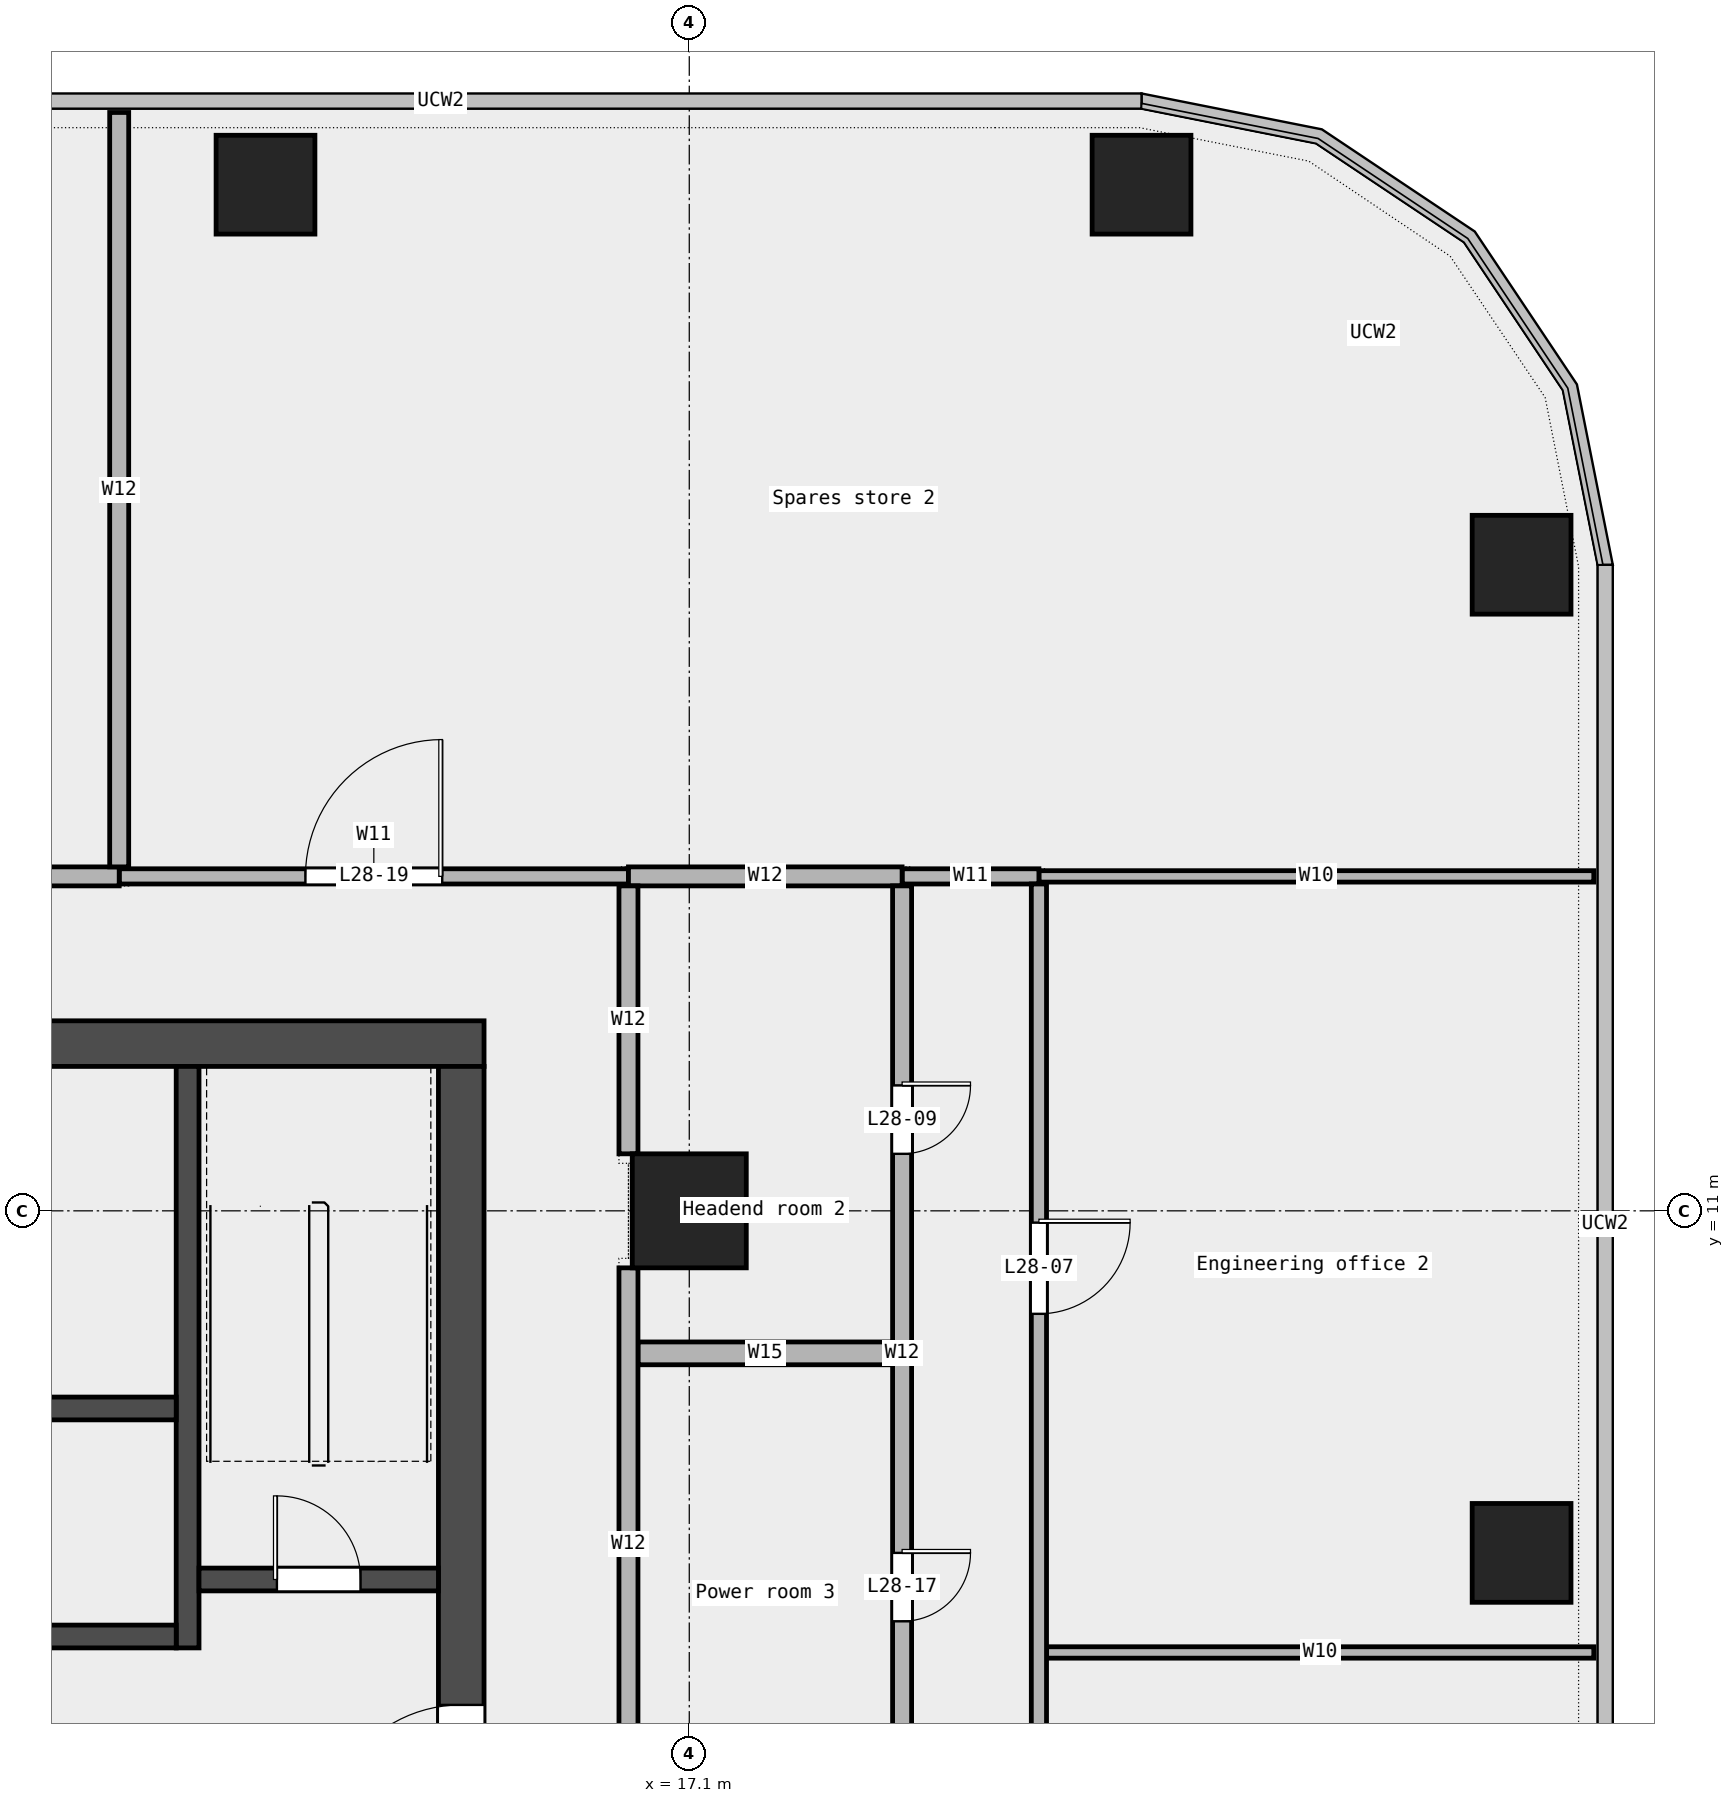
"""IFC4 building model, lengths in metres.
Left out: names, types, materials, properties, quantities, classifications, styles, units other than length and angle.
Written with IfcOpenShell. Run it as: python <this file> out.ifc"""

import sys

from ifc_helpers import new_model, si_unit, direction, frame, frame_2d, origin, origin_2d, place, context, subcontext, project, spatial, rectangle, extrude, element, fill, save


model = new_model("IFC4")
c1 = context("Model", 3, precision=1e-05, world=origin(), true_north=direction((0.0, 1.0)))
c2 = subcontext(c1, "Body", "Model", "MODEL_VIEW")
j1 = project(units=[si_unit("LENGTHUNIT", "METRE"), si_unit("PLANEANGLEUNIT", "RADIAN")], contexts=[c1])
p1 = place(None, origin())
s1 = spatial("IfcSite", under=j1, at=p1, CompositionType="ELEMENT")
p2 = place(p1, origin())
s2 = spatial("IfcBuilding", under=s1, at=p2, CompositionType="ELEMENT")
p3 = place(p2, frame((0.0, 0.0, 139.6)))
s3 = spatial("IfcBuildingStorey", under=s2, at=p3, CompositionType="ELEMENT", Elevation=139.6)
for number, where, z_axis, x_axis in (
    (1, (28.05, 6.5, 0.0), (0.0, 0.0, 1.0), (1.0, 0.0, 0.0)),
    (2, (28.05, 19.5, 0.0), (0.0, 0.0, 1.0), (1.0, 0.0, 0.0)),
    (3, (23.05, 24.5, 0.0), (0.0, 0.0, 1.0), (1.0, 0.0, 0.0)),
    (4, (11.525, 24.5, 0.0), (0.0, 0.0, 1.0), (1.0, 0.0, 0.0)),
):
    element("IfcColumn", number, at=place(p3, frame(where, z_axis=z_axis, x_axis=x_axis)), inside=s3, PredefinedType="COLUMN", context=c2, shape_type="SweptSolid", body=[
        extrude(rectangle(XDim=1.3, YDim=1.3, at=origin_2d()), origin(), (0.0, 0.0, 1.0), 4.05),
    ])
p4 = place(p3, frame((17.1, 11.0, 0.0), z_axis=(0.0, 0.0, 1.0), x_axis=(1.0, 0.0, 0.0)))
e5 = element("IfcColumn", 5, at=p4, inside=s3, PredefinedType="COLUMN", context=c2, shape_type="SweptSolid", body=[
    extrude(rectangle(XDim=1.5, YDim=1.5, at=origin_2d()), origin(), (0.0, 0.0, 1.0), 4.05),
])
p5 = place(p3, frame((21.8, 5.19, 0.0), z_axis=(0.0, 0.0, 1.0), x_axis=(1.0, 0.0, 0.0)))
e6 = element("IfcWall", 6, at=p5, inside=s3, PredefinedType="PARTITIONING", context=c2, shape_type="SweptSolid", body=[
    extrude(rectangle(XDim=7.2, YDim=0.15, at=frame_2d((3.6, 0.0))), origin(), (0.0, 0.0, 1.0), 4.05),
])
p6 = place(p3, frame((16.425, 9.125, 0.0), z_axis=(0.0, 0.0, 1.0), x_axis=(1.0, 0.0, 0.0)))
e7 = element("IfcWall", 7, at=p6, inside=s3, PredefinedType="PARTITIONING", context=c2, shape_type="SweptSolid", body=[
    extrude(rectangle(XDim=3.35, YDim=0.3, at=frame_2d((1.675, 0.0))), origin(), (0.0, 0.0, 1.0), 4.05),
])
p7 = place(p3, frame((21.7, 15.4, 0.0), z_axis=(0.0, 0.0, 1.0), x_axis=(1.0, 0.0, 0.0)))
e8 = element("IfcWall", 8, at=p7, inside=s3, PredefinedType="PARTITIONING", context=c2, shape_type="SweptSolid", body=[
    extrude(rectangle(XDim=7.3, YDim=0.15, at=frame_2d((3.65, 0.0))), origin(), (0.0, 0.0, 1.0), 4.05),
])
p8 = place(p3, frame((9.6, 15.4, 0.0), z_axis=(0.0, 0.0, 1.0), x_axis=(1.0, 0.0, 0.0)))
e9 = element("IfcWall", 9, at=p8, inside=s3, PredefinedType="PARTITIONING", context=c2, shape_type="SweptSolid", body=[
    extrude(rectangle(XDim=6.7, YDim=0.2, at=frame_2d((3.35, 0.0))), origin(), (0.0, 0.0, 1.0), 4.05),
])
p9 = place(p8, frame((2.45, 0.0, 0.0)))
e10 = element("IfcOpeningElement", 10, at=p9, cuts=e9, PredefinedType="OPENING", context=c2, shape_type="SweptSolid", body=[
    extrude(rectangle(XDim=1.8, YDim=2.1, at=frame_2d((0.9, 1.05))), frame((0.0, 0.112, 0.0), z_axis=(0.0, -1.0, 0.0), x_axis=(1.0, 0.0, 0.0)), (0.0, 0.0, 1.0), 0.224),
])
p10 = place(p3, frame((19.9, 15.4, 0.0), z_axis=(0.0, 0.0, 1.0), x_axis=(1.0, 0.0, 0.0)))
e11 = element("IfcWall", 11, at=p10, inside=s3, PredefinedType="PARTITIONING", context=c2, shape_type="SweptSolid", body=[
    extrude(rectangle(XDim=1.8, YDim=0.2, at=frame_2d((0.9, 0.0))), origin(), (0.0, 0.0, 1.0), 4.05),
])
p11 = place(p3, frame((4.61, 15.4, 0.0), z_axis=(0.0, 0.0, 1.0), x_axis=(1.0, 0.0, 0.0)))
e12 = element("IfcWall", 12, at=p11, inside=s3, PredefinedType="PARTITIONING", context=c2, shape_type="SweptSolid", body=[
    extrude(rectangle(XDim=4.99, YDim=0.25, at=frame_2d((2.495, 0.0))), origin(), (0.0, 0.0, 1.0), 4.05),
])
p12 = place(p11, frame((1.895, 0.0, 0.0)))
e13 = element("IfcOpeningElement", 13, at=p12, cuts=e12, PredefinedType="OPENING", context=c2, shape_type="SweptSolid", body=[
    extrude(rectangle(XDim=1.2, YDim=2.1, at=frame_2d((0.6, 1.05))), frame((0.0, 0.137, 0.0), z_axis=(0.0, -1.0, 0.0), x_axis=(1.0, 0.0, 0.0)), (0.0, 0.0, 1.0), 0.274),
])
p13 = place(p3, frame((16.3, 15.4, 0.0), z_axis=(0.0, 0.0, 1.0), x_axis=(1.0, 0.0, 0.0)))
e14 = element("IfcWall", 14, at=p13, inside=s3, PredefinedType="PARTITIONING", context=c2, shape_type="SweptSolid", body=[
    extrude(rectangle(XDim=3.6, YDim=0.25, at=frame_2d((1.8, 0.0))), origin(), (0.0, 0.0, 1.0), 4.05),
])
p14 = place(p3, frame((9.6, 15.525, 0.0), z_axis=(0.0, 0.0, 1.0), x_axis=(0.0, 1.0, 0.0)))
e15 = element("IfcWall", 15, at=p14, inside=s3, PredefinedType="PARTITIONING", context=c2, shape_type="SweptSolid", body=[
    extrude(rectangle(XDim=9.925, YDim=0.25, at=frame_2d((4.962, 0.0))), origin(), (0.0, 0.0, 1.0), 4.05),
])
p15 = place(p3, frame((16.3, 2.975, 0.0), z_axis=(0.0, 0.0, 1.0), x_axis=(0.0, 1.0, 0.0)))
e16 = element("IfcWall", 16, at=p15, inside=s3, PredefinedType="PARTITIONING", context=c2, shape_type="SweptSolid", body=[
    extrude(rectangle(XDim=7.275, YDim=0.25, at=frame_2d((3.637, 0.0))), origin(), (0.0, 0.0, 1.0), 4.05),
])
p16 = place(p3, frame((16.3, 11.75, 0.0), z_axis=(0.0, 0.0, 1.0), x_axis=(0.0, 1.0, 0.0)))
e17 = element("IfcWall", 17, at=p16, inside=s3, PredefinedType="PARTITIONING", context=c2, shape_type="SweptSolid", body=[
    extrude(rectangle(XDim=3.525, YDim=0.25, at=frame_2d((1.762, 0.0))), origin(), (0.0, 0.0, 1.0), 4.05),
])
p17 = place(p3, frame((19.9, 2.975, 0.0), z_axis=(0.0, 0.0, 1.0), x_axis=(0.0, 1.0, 0.0)))
e18 = element("IfcWall", 18, at=p17, inside=s3, PredefinedType="PARTITIONING", context=c2, shape_type="SweptSolid", body=[
    extrude(rectangle(XDim=12.3, YDim=0.25, at=frame_2d((6.15, 0.0))), origin(), (0.0, 0.0, 1.0), 4.05),
])
p18 = place(p17, frame((8.775, 0.0, 0.0)))
e19 = element("IfcOpeningElement", 19, at=p18, cuts=e18, PredefinedType="OPENING", context=c2, shape_type="SweptSolid", body=[
    extrude(rectangle(XDim=0.9, YDim=2.1, at=frame_2d((0.45, 1.05))), frame((0.0, 0.137, 0.0), z_axis=(0.0, -1.0, 0.0), x_axis=(1.0, 0.0, 0.0)), (0.0, 0.0, 1.0), 0.274),
])
p19 = place(p17, frame((2.625, 0.0, 0.0)))
e20 = element("IfcOpeningElement", 20, at=p19, cuts=e18, PredefinedType="OPENING", context=c2, shape_type="SweptSolid", body=[
    extrude(rectangle(XDim=0.9, YDim=2.1, at=frame_2d((0.45, 1.05))), frame((0.0, 0.137, 0.0), z_axis=(0.0, -1.0, 0.0), x_axis=(1.0, 0.0, 0.0)), (0.0, 0.0, 1.0), 0.274),
])
p20 = place(p3, frame((21.7, -9.0, 0.0), z_axis=(0.0, 0.0, 1.0), x_axis=(0.0, 1.0, 0.0)))
e21 = element("IfcWall", 21, at=p20, inside=s3, PredefinedType="PARTITIONING", context=c2, shape_type="SweptSolid", body=[
    extrude(rectangle(XDim=24.3, YDim=0.2, at=frame_2d((12.15, 0.0))), origin(), (0.0, 0.0, 1.0), 4.05),
])
p21 = place(p20, frame((18.645, 0.0, 0.0)))
e22 = element("IfcOpeningElement", 22, at=p21, cuts=e21, PredefinedType="OPENING", context=c2, shape_type="SweptSolid", body=[
    extrude(rectangle(XDim=1.2, YDim=2.1, at=frame_2d((0.6, 1.05))), frame((0.0, 0.112, 0.0), z_axis=(0.0, -1.0, 0.0), x_axis=(1.0, 0.0, 0.0)), (0.0, 0.0, 1.0), 0.224),
])
p22 = place(p20, frame((4.833, 0.0, 0.0)))
e23 = element("IfcOpeningElement", 23, at=p22, cuts=e21, PredefinedType="OPENING", context=c2, shape_type="SweptSolid", body=[
    extrude(rectangle(XDim=1.5, YDim=2.1, at=frame_2d((0.75, 1.05))), frame((0.0, 0.112, 0.0), z_axis=(0.0, -1.0, 0.0), x_axis=(1.0, 0.0, 0.0)), (0.0, 0.0, 1.0), 0.224),
])
p23 = place(p20, frame((12.228, 0.0, 0.0)))
e24 = element("IfcOpeningElement", 24, at=p23, cuts=e21, PredefinedType="OPENING", context=c2, shape_type="SweptSolid", body=[
    extrude(rectangle(XDim=0.9, YDim=2.1, at=frame_2d((0.45, 1.05))), frame((0.0, 0.112, 0.0), z_axis=(0.0, -1.0, 0.0), x_axis=(1.0, 0.0, 0.0)), (0.0, 0.0, 1.0), 0.224),
])
p24 = place(p3, frame((-14.4, 13.2, 0.0), z_axis=(0.0, 0.0, 1.0), x_axis=(1.0, 0.0, 0.0)))
e25 = element("IfcWall", 25, at=p24, inside=s3, PredefinedType="SHEAR", context=c2, shape_type="SweptSolid", body=[
    extrude(rectangle(XDim=28.8, YDim=0.6, at=frame_2d((14.4, 0.0))), origin(), (0.0, 0.0, 1.0), 4.2),
])
p25 = place(p24, frame((6.775, 0.0, 0.0)))
e26 = element("IfcOpeningElement", 26, at=p25, cuts=e25, PredefinedType="OPENING", context=c2, shape_type="SweptSolid", body=[
    extrude(rectangle(XDim=1.0, YDim=2.1, at=frame_2d((0.5, 1.05))), frame((0.0, 0.312, 0.0), z_axis=(0.0, -1.0, 0.0), x_axis=(1.0, 0.0, 0.0)), (0.0, 0.0, 1.0), 0.624),
])
p26 = place(p24, frame((13.525, 0.0, 0.0)))
e27 = element("IfcOpeningElement", 27, at=p26, cuts=e25, PredefinedType="OPENING", context=c2, shape_type="SweptSolid", body=[
    extrude(rectangle(XDim=1.0, YDim=2.1, at=frame_2d((0.5, 1.05))), frame((0.0, 0.312, 0.0), z_axis=(0.0, -1.0, 0.0), x_axis=(1.0, 0.0, 0.0)), (0.0, 0.0, 1.0), 0.624),
])
p27 = place(p24, frame((20.65, 0.0, 0.0)))
e28 = element("IfcOpeningElement", 28, at=p27, cuts=e25, PredefinedType="OPENING", context=c2, shape_type="SweptSolid", body=[
    extrude(rectangle(XDim=1.0, YDim=2.1, at=frame_2d((0.5, 1.05))), frame((0.0, 0.312, 0.0), z_axis=(0.0, -1.0, 0.0), x_axis=(1.0, 0.0, 0.0)), (0.0, 0.0, 1.0), 0.624),
])
p28 = place(p3, frame((14.1, -6.6, 0.0), z_axis=(0.0, 0.0, 1.0), x_axis=(0.0, 1.0, 0.0)))
e29 = element("IfcWall", 29, at=p28, inside=s3, PredefinedType="SHEAR", context=c2, shape_type="SweptSolid", body=[
    extrude(rectangle(XDim=19.5, YDim=0.6, at=frame_2d((9.75, 0.0))), origin(), (0.0, 0.0, 1.0), 4.2),
])
p29 = place(p28, frame((9.3, 0.0, 0.0)))
e30 = element("IfcOpeningElement", 30, at=p29, cuts=e29, PredefinedType="OPENING", context=c2, shape_type="SweptSolid", body=[
    extrude(rectangle(XDim=1.8, YDim=2.1, at=frame_2d((0.9, 1.05))), frame((0.0, 0.312, 0.0), z_axis=(0.0, -1.0, 0.0), x_axis=(1.0, 0.0, 0.0)), (0.0, 0.0, 1.0), 0.624),
])
p30 = place(p3, frame((10.5, 5.25, 0.0), z_axis=(0.0, 0.0, 1.0), x_axis=(0.0, 1.0, 0.0)))
e31 = element("IfcWall", 31, at=p30, inside=s3, PredefinedType="SHEAR", context=c2, shape_type="SweptSolid", body=[
    extrude(rectangle(XDim=7.65, YDim=0.3, at=frame_2d((3.825, 0.0))), origin(), (0.0, 0.0, 1.0), 4.2),
])
p31 = place(p3, frame((10.65, 6.15, 0.0), z_axis=(0.0, 0.0, 1.0), x_axis=(1.0, 0.0, 0.0)))
e32 = element("IfcWall", 32, at=p31, inside=s3, PredefinedType="SOLIDWALL", context=c2, shape_type="SweptSolid", body=[
    extrude(rectangle(XDim=3.15, YDim=0.3, at=frame_2d((1.575, 0.0))), origin(), (0.0, 0.0, 1.0), 4.2),
])
p32 = place(p31, frame((1.025, 0.0, 0.0)))
e33 = element("IfcOpeningElement", 33, at=p32, cuts=e32, PredefinedType="OPENING", context=c2, shape_type="SweptSolid", body=[
    extrude(rectangle(XDim=1.1, YDim=2.1, at=frame_2d((0.55, 1.05))), frame((0.0, 0.162, 0.0), z_axis=(0.0, -1.0, 0.0), x_axis=(1.0, 0.0, 0.0)), (0.0, 0.0, 1.0), 0.324),
])
p33 = place(p3, frame((-10.35, 5.4, 0.0), z_axis=(0.0, 0.0, 1.0), x_axis=(1.0, 0.0, 0.0)))
e34 = element("IfcWall", 34, at=p33, inside=s3, PredefinedType="SOLIDWALL", context=c2, shape_type="SweptSolid", body=[
    extrude(rectangle(XDim=20.7, YDim=0.3, at=frame_2d((10.35, 0.0))), origin(), (0.0, 0.0, 1.0), 4.2),
])
p34 = place(p33, frame((0.512, 0.0, 0.0)))
e35 = element("IfcOpeningElement", 35, at=p34, cuts=e34, PredefinedType="OPENING", context=c2, shape_type="SweptSolid", body=[
    extrude(rectangle(XDim=1.3, YDim=2.1, at=frame_2d((0.65, 1.05))), frame((0.0, 0.162, 0.0), z_axis=(0.0, -1.0, 0.0), x_axis=(1.0, 0.0, 0.0)), (0.0, 0.0, 1.0), 0.324),
])
p35 = place(p3, frame((-10.35, 8.4, 0.0), z_axis=(0.0, 0.0, 1.0), x_axis=(1.0, 0.0, 0.0)))
e36 = element("IfcWall", 36, at=p35, inside=s3, PredefinedType="SOLIDWALL", context=c2, shape_type="SweptSolid", body=[
    extrude(rectangle(XDim=20.7, YDim=0.3, at=frame_2d((10.35, 0.0))), origin(), (0.0, 0.0, 1.0), 4.2),
])
p36 = place(p21, origin())
e37 = element("IfcDoor", 37, at=p36, inside=s3, OperationType="SINGLE_SWING_LEFT", PredefinedType="DOOR", context=c2, shape_type="SweptSolid", body=[
    extrude(rectangle(XDim=1.2, YDim=2.1, at=frame_2d((0.6, 1.05))), frame((0.0, 0.025, 0.0), z_axis=(0.0, -1.0, 0.0), x_axis=(1.0, 0.0, 0.0)), (0.0, 0.0, 1.0), 0.05),
])
fill(e22, e37)
p37 = place(p18, origin())
e38 = element("IfcDoor", 38, at=p37, inside=s3, OperationType="SINGLE_SWING_LEFT", PredefinedType="DOOR", context=c2, shape_type="SweptSolid", body=[
    extrude(rectangle(XDim=0.9, YDim=2.1, at=frame_2d((0.45, 1.05))), frame((0.0, 0.025, 0.0), z_axis=(0.0, -1.0, 0.0), x_axis=(1.0, 0.0, 0.0)), (0.0, 0.0, 1.0), 0.05),
])
fill(e19, e38)
p38 = place(p19, origin())
e39 = element("IfcDoor", 39, at=p38, inside=s3, OperationType="SINGLE_SWING_LEFT", PredefinedType="DOOR", context=c2, shape_type="SweptSolid", body=[
    extrude(rectangle(XDim=0.9, YDim=2.1, at=frame_2d((0.45, 1.05))), frame((0.0, 0.025, 0.0), z_axis=(0.0, -1.0, 0.0), x_axis=(1.0, 0.0, 0.0)), (0.0, 0.0, 1.0), 0.05),
])
fill(e20, e39)
p39 = place(p9, origin())
e40 = element("IfcDoor", 40, at=p39, inside=s3, OperationType="DOUBLE_DOOR_SINGLE_SWING", PredefinedType="DOOR", context=c2, shape_type="SweptSolid", body=[
    extrude(rectangle(XDim=1.8, YDim=2.1, at=frame_2d((0.9, 1.05))), frame((0.0, 0.025, 0.0), z_axis=(0.0, -1.0, 0.0), x_axis=(1.0, 0.0, 0.0)), (0.0, 0.0, 1.0), 0.05),
])
fill(e10, e40)
p40 = place(p32, origin())
e41 = element("IfcDoor", 41, at=p40, inside=s3, OperationType="SINGLE_SWING_RIGHT", PredefinedType="DOOR", context=c2, shape_type="SweptSolid", body=[
    extrude(rectangle(XDim=1.1, YDim=2.1, at=frame_2d((0.55, 1.05))), frame((0.0, 0.025, 0.0), z_axis=(0.0, -1.0, 0.0), x_axis=(1.0, 0.0, 0.0)), (0.0, 0.0, 1.0), 0.05),
])
fill(e33, e41)
p41 = place(p29, origin())
e42 = element("IfcDoor", 42, at=p41, inside=s3, OperationType="DOUBLE_DOOR_SINGLE_SWING", PredefinedType="DOOR", context=c2, shape_type="SweptSolid", body=[
    extrude(rectangle(XDim=1.8, YDim=2.1, at=frame_2d((0.9, 1.05))), frame((0.0, 0.025, 0.0), z_axis=(0.0, -1.0, 0.0), x_axis=(1.0, 0.0, 0.0)), (0.0, 0.0, 1.0), 0.05),
])
fill(e30, e42)
save(model, sys.argv[1])
